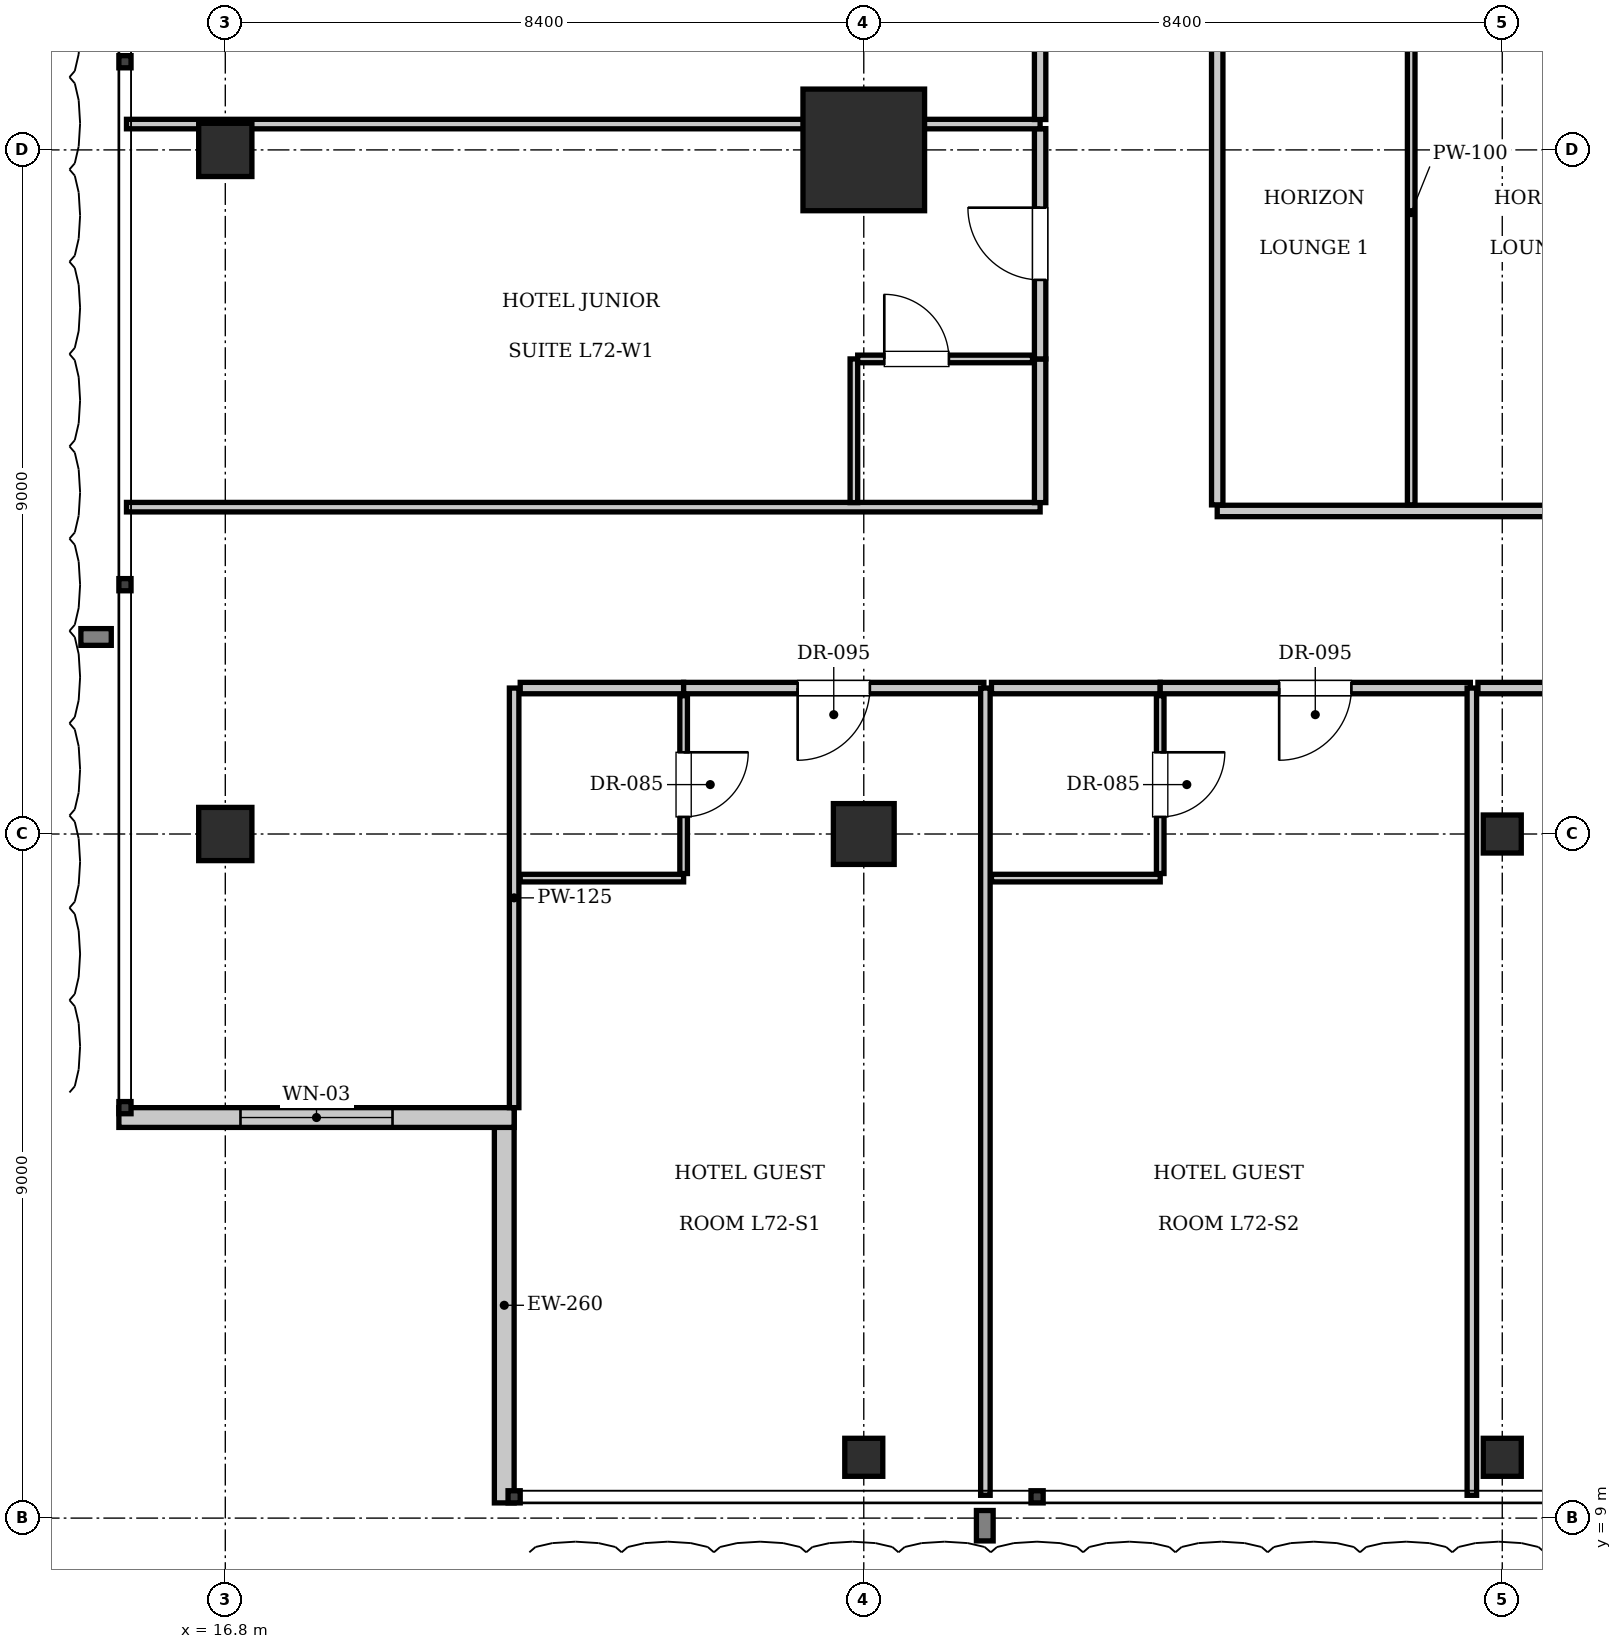
"""IFC4 building model, lengths in metres.
Left out: names, types, materials, properties, quantities, classifications, styles, units other than length and angle.
Written with IfcOpenShell. Run it as: python <this file> out.ifc"""

import sys

from ifc_helpers import new_model, si_unit, direction, frame, frame_2d, origin, origin_2d, place, context, subcontext, project, spatial, rectangle, i_section, extrude, element, fill, save


model = new_model("IFC4")
c1 = context("Model", 3, precision=1e-05, world=origin(), true_north=direction((0.0, 1.0)))
c2 = subcontext(c1, "Body", "Model", "MODEL_VIEW")
j1 = project(units=[si_unit("LENGTHUNIT", "METRE"), si_unit("PLANEANGLEUNIT", "RADIAN")], contexts=[c1])
p1 = place(None, origin())
s1 = spatial("IfcSite", under=j1, at=p1, CompositionType="ELEMENT")
p2 = place(p1, origin())
s2 = spatial("IfcBuilding", under=s1, at=p2, CompositionType="ELEMENT")
p3 = place(p2, frame((0.0, 0.0, 293.3)))
s3 = spatial("IfcBuildingStorey", under=s2, at=p3, CompositionType="ELEMENT", Elevation=293.3)
p4 = place(p3, frame((25.2, 27.0, 0.0), z_axis=(0.0, 0.0, 1.0), x_axis=(1.0, 0.0, 0.0)))
e1 = element("IfcColumn", 1, at=p4, inside=s3, PredefinedType="COLUMN", context=c2, shape_type="SweptSolid", body=[
    extrude(rectangle(XDim=1.6, YDim=1.6, at=origin_2d()), origin(), (0.0, 0.0, 1.0), 3.85),
])
p5 = place(p3, frame((25.2, 18.0, 0.0), z_axis=(0.0, 0.0, 1.0), x_axis=(1.0, 0.0, 0.0)))
e2 = element("IfcColumn", 2, at=p5, inside=s3, PredefinedType="COLUMN", context=c2, shape_type="SweptSolid", body=[
    extrude(rectangle(XDim=0.8, YDim=0.8, at=origin_2d()), origin(), (0.0, 0.0, 1.0), 3.85),
])
p6 = place(p3, frame((33.6, 18.0, 0.0), z_axis=(0.0, 0.0, 1.0), x_axis=(1.0, 0.0, 0.0)))
e3 = element("IfcColumn", 3, at=p6, inside=s3, PredefinedType="COLUMN", context=c2, shape_type="SweptSolid", body=[
    extrude(i_section(OverallWidth=0.5, OverallDepth=0.5, WebThickness=0.022, FlangeThickness=0.032, at=origin_2d()), origin(), (0.0, 0.0, 1.0), 3.85),
])
for number, where, z_axis, x_axis in (
    (4, (16.8, 18.0, 0.0), (0.0, 0.0, 1.0), (1.0, 0.0, 0.0)),
    (5, (16.8, 27.0, 0.0), (0.0, 0.0, 1.0), (1.0, 0.0, 0.0)),
):
    element("IfcColumn", number, at=place(p3, frame(where, z_axis=z_axis, x_axis=x_axis)), inside=s3, PredefinedType="COLUMN", context=c2, shape_type="SweptSolid", body=[
        extrude(rectangle(XDim=0.7, YDim=0.7, at=origin_2d()), origin(), (0.0, 0.0, 1.0), 3.85),
    ])
for number, where, z_axis, x_axis in (
    (6, (25.2, 9.8, 0.0), (0.0, 0.0, 1.0), (1.0, 0.0, 0.0)),
    (7, (33.6, 9.8, 0.0), (0.0, 0.0, 1.0), (1.0, 0.0, 0.0)),
):
    element("IfcColumn", number, at=place(p3, frame(where, z_axis=z_axis, x_axis=x_axis)), inside=s3, PredefinedType="COLUMN", context=c2, shape_type="SweptSolid", body=[
        extrude(i_section(OverallWidth=0.5, OverallDepth=0.5, WebThickness=0.022, FlangeThickness=0.032, at=origin_2d()), origin(), (0.0, 0.0, 1.0), 3.85),
    ])
p7 = place(p3, frame((20.47, 9.2, 0.0), z_axis=(0.0, 0.0, 1.0), x_axis=(0.0, 1.0, 0.0)))
e8 = element("IfcWall", 8, at=p7, inside=s3, PredefinedType="SOLIDWALL", context=c2, shape_type="SweptSolid", body=[
    extrude(rectangle(XDim=5.2, YDim=0.26, at=frame_2d((2.6, 0.0))), origin(), (0.0, 0.0, 1.0), 3.61),
])
p8 = place(p3, frame((20.6, 14.27, 0.0), z_axis=(0.0, 0.0, 1.0), x_axis=(-1.0, 0.0, 0.0)))
e9 = element("IfcWall", 9, at=p8, inside=s3, PredefinedType="SOLIDWALL", context=c2, shape_type="SweptSolid", body=[
    extrude(rectangle(XDim=5.2, YDim=0.26, at=frame_2d((2.6, 0.0))), origin(), (0.0, 0.0, 1.0), 3.61),
])
p9 = place(p8, frame((1.6, 0.0, 0.9)))
e10 = element("IfcOpeningElement", 10, at=p9, cuts=e9, PredefinedType="OPENING", context=c2, shape_type="SweptSolid", body=[
    extrude(rectangle(XDim=2.0, YDim=2.2, at=frame_2d((1.0, 1.1))), frame((0.0, 0.14, 0.0), z_axis=(0.0, -1.0, 0.0), x_axis=(1.0, 0.0, 0.0)), (0.0, 0.0, 1.0), 0.28),
])
p10 = place(p3, frame((29.85, 22.25, 0.0), z_axis=(0.0, 0.0, 1.0), x_axis=(1.0, 0.0, 0.0)))
e11 = element("IfcWall", 11, at=p10, inside=s3, PredefinedType="PARTITIONING", context=c2, shape_type="SweptSolid", body=[
    extrude(rectangle(XDim=15.95, YDim=0.15, at=frame_2d((7.975, 0.0))), origin(), (0.0, 0.0, 1.0), 3.61),
])
p11 = place(p3, frame((29.85, 22.33, 0.0), z_axis=(0.0, 0.0, 1.0), x_axis=(0.0, 1.0, 0.0)))
e12 = element("IfcWall", 12, at=p11, inside=s3, PredefinedType="PARTITIONING", context=c2, shape_type="SweptSolid", body=[
    extrude(rectangle(XDim=7.69, YDim=0.15, at=frame_2d((3.845, 0.0))), origin(), (0.0, 0.0, 1.0), 3.61),
])
p12 = place(p3, frame((32.402, 22.33, 0.0), z_axis=(0.0, 0.0, 1.0), x_axis=(0.0, 1.0, 0.0)))
e13 = element("IfcWall", 13, at=p12, inside=s3, PredefinedType="PARTITIONING", context=c2, shape_type="SweptSolid", body=[
    extrude(rectangle(XDim=7.69, YDim=0.1, at=frame_2d((3.845, 0.0))), origin(), (0.0, 0.0, 1.0), 3.61),
])
p13 = place(p3, frame((20.6, 14.4, 0.0), z_axis=(0.0, 0.0, 1.0), x_axis=(0.0, 1.0, 0.0)))
e14 = element("IfcWall", 14, at=p13, inside=s3, PredefinedType="PARTITIONING", context=c2, shape_type="SweptSolid", body=[
    extrude(rectangle(XDim=5.52, YDim=0.125, at=frame_2d((2.76, 0.0))), origin(), (0.0, 0.0, 1.0), 3.61),
])
p14 = place(p3, frame((20.68, 19.92, 0.0), z_axis=(0.0, 0.0, 1.0), x_axis=(1.0, 0.0, 0.0)))
e15 = element("IfcWall", 15, at=p14, inside=s3, PredefinedType="PARTITIONING", context=c2, shape_type="SweptSolid", body=[
    extrude(rectangle(XDim=2.15, YDim=0.15, at=frame_2d((1.075, 0.0))), origin(), (0.0, 0.0, 1.0), 3.61),
])
p15 = place(p3, frame((20.68, 17.42, 0.0), z_axis=(0.0, 0.0, 1.0), x_axis=(1.0, 0.0, 0.0)))
e16 = element("IfcWall", 16, at=p15, inside=s3, PredefinedType="PARTITIONING", context=c2, shape_type="SweptSolid", body=[
    extrude(rectangle(XDim=2.15, YDim=0.1, at=frame_2d((1.075, 0.0))), origin(), (0.0, 0.0, 1.0), 3.61),
])
p16 = place(p3, frame((22.83, 17.48, 0.0), z_axis=(0.0, 0.0, 1.0), x_axis=(0.0, 1.0, 0.0)))
e17 = element("IfcWall", 17, at=p16, inside=s3, PredefinedType="PARTITIONING", context=c2, shape_type="SweptSolid", body=[
    extrude(rectangle(XDim=2.34, YDim=0.1, at=frame_2d((1.17, 0.0))), origin(), (0.0, 0.0, 1.0), 3.61),
])
p17 = place(p16, frame((0.745, 0.0, 0.0)))
e18 = element("IfcOpeningElement", 18, at=p17, cuts=e17, PredefinedType="OPENING", context=c2, shape_type="SweptSolid", body=[
    extrude(rectangle(XDim=0.85, YDim=2.1, at=frame_2d((0.425, 1.05))), frame((0.0, 0.06, 0.0), z_axis=(0.0, -1.0, 0.0), x_axis=(1.0, 0.0, 0.0)), (0.0, 0.0, 1.0), 0.12),
])
p18 = place(p3, frame((22.83, 19.92, 0.0), z_axis=(0.0, 0.0, 1.0), x_axis=(1.0, 0.0, 0.0)))
e19 = element("IfcWall", 19, at=p18, inside=s3, PredefinedType="PARTITIONING", context=c2, shape_type="SweptSolid", body=[
    extrude(rectangle(XDim=3.95, YDim=0.15, at=frame_2d((1.975, 0.0))), origin(), (0.0, 0.0, 1.0), 3.61),
])
p19 = place(p18, frame((1.5, 0.0, 0.0)))
e20 = element("IfcOpeningElement", 20, at=p19, cuts=e19, PredefinedType="OPENING", context=c2, shape_type="SweptSolid", body=[
    extrude(rectangle(XDim=0.95, YDim=2.15, at=frame_2d((0.475, 1.075))), frame((0.0, 0.085, 0.0), z_axis=(0.0, -1.0, 0.0), x_axis=(1.0, 0.0, 0.0)), (0.0, 0.0, 1.0), 0.17),
])
p20 = place(p3, frame((26.8, 9.3, 0.0), z_axis=(0.0, 0.0, 1.0), x_axis=(0.0, 1.0, 0.0)))
e21 = element("IfcWall", 21, at=p20, inside=s3, PredefinedType="PARTITIONING", context=c2, shape_type="SweptSolid", body=[
    extrude(rectangle(XDim=10.62, YDim=0.125, at=frame_2d((5.31, 0.0))), origin(), (0.0, 0.0, 1.0), 3.61),
])
p21 = place(p3, frame((26.88, 19.92, 0.0), z_axis=(0.0, 0.0, 1.0), x_axis=(1.0, 0.0, 0.0)))
e22 = element("IfcWall", 22, at=p21, inside=s3, PredefinedType="PARTITIONING", context=c2, shape_type="SweptSolid", body=[
    extrude(rectangle(XDim=2.22, YDim=0.15, at=frame_2d((1.11, 0.0))), origin(), (0.0, 0.0, 1.0), 3.61),
])
p22 = place(p3, frame((26.88, 17.42, 0.0), z_axis=(0.0, 0.0, 1.0), x_axis=(1.0, 0.0, 0.0)))
e23 = element("IfcWall", 23, at=p22, inside=s3, PredefinedType="PARTITIONING", context=c2, shape_type="SweptSolid", body=[
    extrude(rectangle(XDim=2.22, YDim=0.1, at=frame_2d((1.11, 0.0))), origin(), (0.0, 0.0, 1.0), 3.61),
])
p23 = place(p3, frame((29.1, 17.48, 0.0), z_axis=(0.0, 0.0, 1.0), x_axis=(0.0, 1.0, 0.0)))
e24 = element("IfcWall", 24, at=p23, inside=s3, PredefinedType="PARTITIONING", context=c2, shape_type="SweptSolid", body=[
    extrude(rectangle(XDim=2.34, YDim=0.1, at=frame_2d((1.17, 0.0))), origin(), (0.0, 0.0, 1.0), 3.61),
])
p24 = place(p23, frame((0.745, 0.0, 0.0)))
e25 = element("IfcOpeningElement", 25, at=p24, cuts=e24, PredefinedType="OPENING", context=c2, shape_type="SweptSolid", body=[
    extrude(rectangle(XDim=0.85, YDim=2.1, at=frame_2d((0.425, 1.05))), frame((0.0, 0.06, 0.0), z_axis=(0.0, -1.0, 0.0), x_axis=(1.0, 0.0, 0.0)), (0.0, 0.0, 1.0), 0.12),
])
p25 = place(p3, frame((29.1, 19.92, 0.0), z_axis=(0.0, 0.0, 1.0), x_axis=(1.0, 0.0, 0.0)))
e26 = element("IfcWall", 26, at=p25, inside=s3, PredefinedType="PARTITIONING", context=c2, shape_type="SweptSolid", body=[
    extrude(rectangle(XDim=4.08, YDim=0.15, at=frame_2d((2.04, 0.0))), origin(), (0.0, 0.0, 1.0), 3.61),
])
p26 = place(p25, frame((1.565, 0.0, 0.0)))
e27 = element("IfcOpeningElement", 27, at=p26, cuts=e26, PredefinedType="OPENING", context=c2, shape_type="SweptSolid", body=[
    extrude(rectangle(XDim=0.95, YDim=2.15, at=frame_2d((0.475, 1.075))), frame((0.0, 0.085, 0.0), z_axis=(0.0, -1.0, 0.0), x_axis=(1.0, 0.0, 0.0)), (0.0, 0.0, 1.0), 0.17),
])
p27 = place(p3, frame((33.2, 9.3, 0.0), z_axis=(0.0, 0.0, 1.0), x_axis=(0.0, 1.0, 0.0)))
e28 = element("IfcWall", 28, at=p27, inside=s3, PredefinedType="PARTITIONING", context=c2, shape_type="SweptSolid", body=[
    extrude(rectangle(XDim=10.62, YDim=0.125, at=frame_2d((5.31, 0.0))), origin(), (0.0, 0.0, 1.0), 3.61),
])
p28 = place(p3, frame((33.28, 19.92, 0.0), z_axis=(0.0, 0.0, 1.0), x_axis=(1.0, 0.0, 0.0)))
e29 = element("IfcWall", 29, at=p28, inside=s3, PredefinedType="PARTITIONING", context=c2, shape_type="SweptSolid", body=[
    extrude(rectangle(XDim=4.17, YDim=0.15, at=frame_2d((2.085, 0.0))), origin(), (0.0, 0.0, 1.0), 3.61),
])
p29 = place(p28, frame((1.61, 0.0, 0.0)))
e30 = element("IfcOpeningElement", 30, at=p29, cuts=e29, PredefinedType="OPENING", context=c2, shape_type="SweptSolid", body=[
    extrude(rectangle(XDim=0.95, YDim=2.15, at=frame_2d((0.475, 1.075))), frame((0.0, 0.085, 0.0), z_axis=(0.0, -1.0, 0.0), x_axis=(1.0, 0.0, 0.0)), (0.0, 0.0, 1.0), 0.17),
])
p30 = place(p3, frame((15.5, 22.3, 0.0), z_axis=(0.0, 0.0, 1.0), x_axis=(1.0, 0.0, 0.0)))
e31 = element("IfcWall", 31, at=p30, inside=s3, PredefinedType="PARTITIONING", context=c2, shape_type="SweptSolid", body=[
    extrude(rectangle(XDim=12.02, YDim=0.125, at=frame_2d((6.01, 0.0))), origin(), (0.0, 0.0, 1.0), 3.61),
])
p31 = place(p3, frame((27.52, 22.36, 0.0), z_axis=(0.0, 0.0, 1.0), x_axis=(0.0, 1.0, 0.0)))
e32 = element("IfcWall", 32, at=p31, inside=s3, PredefinedType="PARTITIONING", context=c2, shape_type="SweptSolid", body=[
    extrude(rectangle(XDim=1.89, YDim=0.15, at=frame_2d((0.945, 0.0))), origin(), (0.0, 0.0, 1.0), 3.61),
])
p32 = place(p3, frame((27.52, 24.25, 0.0), z_axis=(0.0, 0.0, 1.0), x_axis=(0.0, 1.0, 0.0)))
e33 = element("IfcWall", 33, at=p32, inside=s3, PredefinedType="PARTITIONING", context=c2, shape_type="SweptSolid", body=[
    extrude(rectangle(XDim=3.03, YDim=0.15, at=frame_2d((1.515, 0.0))), origin(), (0.0, 0.0, 1.0), 3.61),
])
p33 = place(p32, frame((1.04, 0.0, 0.0)))
e34 = element("IfcOpeningElement", 34, at=p33, cuts=e33, PredefinedType="OPENING", context=c2, shape_type="SweptSolid", body=[
    extrude(rectangle(XDim=0.95, YDim=2.15, at=frame_2d((0.475, 1.075))), frame((0.0, 0.085, 0.0), z_axis=(0.0, -1.0, 0.0), x_axis=(1.0, 0.0, 0.0)), (0.0, 0.0, 1.0), 0.17),
])
p34 = place(p3, frame((25.07, 22.36, 0.0), z_axis=(0.0, 0.0, 1.0), x_axis=(0.0, 1.0, 0.0)))
e35 = element("IfcWall", 35, at=p34, inside=s3, PredefinedType="PARTITIONING", context=c2, shape_type="SweptSolid", body=[
    extrude(rectangle(XDim=1.89, YDim=0.1, at=frame_2d((0.945, 0.0))), origin(), (0.0, 0.0, 1.0), 3.61),
])
p35 = place(p3, frame((25.12, 24.25, 0.0), z_axis=(0.0, 0.0, 1.0), x_axis=(1.0, 0.0, 0.0)))
e36 = element("IfcWall", 36, at=p35, inside=s3, PredefinedType="PARTITIONING", context=c2, shape_type="SweptSolid", body=[
    extrude(rectangle(XDim=2.3, YDim=0.1, at=frame_2d((1.15, 0.0))), origin(), (0.0, 0.0, 1.0), 3.61),
])
p36 = place(p35, frame((0.35, 0.0, 0.0)))
e37 = element("IfcOpeningElement", 37, at=p36, cuts=e36, PredefinedType="OPENING", context=c2, shape_type="SweptSolid", body=[
    extrude(rectangle(XDim=0.85, YDim=2.1, at=frame_2d((0.425, 1.05))), frame((0.0, 0.06, 0.0), z_axis=(0.0, -1.0, 0.0), x_axis=(1.0, 0.0, 0.0)), (0.0, 0.0, 1.0), 0.12),
])
p37 = place(p3, frame((15.5, 27.34, 0.0), z_axis=(0.0, 0.0, 1.0), x_axis=(1.0, 0.0, 0.0)))
e38 = element("IfcWall", 38, at=p37, inside=s3, PredefinedType="PARTITIONING", context=c2, shape_type="SweptSolid", body=[
    extrude(rectangle(XDim=12.02, YDim=0.125, at=frame_2d((6.01, 0.0))), origin(), (0.0, 0.0, 1.0), 3.61),
])
p38 = place(p3, frame((27.52, 27.4, 0.0), z_axis=(0.0, 0.0, 1.0), x_axis=(0.0, 1.0, 0.0)))
e39 = element("IfcWall", 39, at=p38, inside=s3, PredefinedType="PARTITIONING", context=c2, shape_type="SweptSolid", body=[
    extrude(rectangle(XDim=3.03, YDim=0.15, at=frame_2d((1.515, 0.0))), origin(), (0.0, 0.0, 1.0), 3.61),
])
p39 = place(p38, frame((1.04, 0.0, 0.0)))
e40 = element("IfcOpeningElement", 40, at=p39, cuts=e39, PredefinedType="OPENING", context=c2, shape_type="SweptSolid", body=[
    extrude(rectangle(XDim=0.95, YDim=2.15, at=frame_2d((0.475, 1.075))), frame((0.0, 0.085, 0.0), z_axis=(0.0, -1.0, 0.0), x_axis=(1.0, 0.0, 0.0)), (0.0, 0.0, 1.0), 0.17),
])
p40 = place(p9, origin())
e41 = element("IfcWindow", 41, at=p40, inside=s3, PartitioningType="SINGLE_PANEL", PredefinedType="WINDOW", context=c2, shape_type="SweptSolid", body=[
    extrude(rectangle(XDim=2.0, YDim=2.2, at=frame_2d((1.0, 1.1))), frame((0.0, 0.03, 0.0), z_axis=(0.0, -1.0, 0.0), x_axis=(1.0, 0.0, 0.0)), (0.0, 0.0, 1.0), 0.06),
])
fill(e10, e41)
p41 = place(p17, frame((0.85, 0.0, 0.0), z_axis=(0.0, 0.0, 1.0), x_axis=(-1.0, 0.0, 0.0)))
e42 = element("IfcDoor", 42, at=p41, inside=s3, OperationType="SINGLE_SWING_LEFT", PredefinedType="DOOR", context=c2, shape_type="SweptSolid", body=[
    extrude(rectangle(XDim=0.85, YDim=2.1, at=frame_2d((0.425, 1.05))), frame((0.0, 0.025, 0.0), z_axis=(0.0, -1.0, 0.0), x_axis=(1.0, 0.0, 0.0)), (0.0, 0.0, 1.0), 0.05),
])
fill(e18, e42)
p42 = place(p19, frame((0.95, 0.0, 0.0), z_axis=(0.0, 0.0, 1.0), x_axis=(-1.0, 0.0, 0.0)))
e43 = element("IfcDoor", 43, at=p42, inside=s3, OperationType="SINGLE_SWING_RIGHT", PredefinedType="DOOR", context=c2, shape_type="SweptSolid", body=[
    extrude(rectangle(XDim=0.95, YDim=2.15, at=frame_2d((0.475, 1.075))), frame((0.0, 0.025, 0.0), z_axis=(0.0, -1.0, 0.0), x_axis=(1.0, 0.0, 0.0)), (0.0, 0.0, 1.0), 0.05),
])
fill(e20, e43)
p43 = place(p24, frame((0.85, 0.0, 0.0), z_axis=(0.0, 0.0, 1.0), x_axis=(-1.0, 0.0, 0.0)))
e44 = element("IfcDoor", 44, at=p43, inside=s3, OperationType="SINGLE_SWING_LEFT", PredefinedType="DOOR", context=c2, shape_type="SweptSolid", body=[
    extrude(rectangle(XDim=0.85, YDim=2.1, at=frame_2d((0.425, 1.05))), frame((0.0, 0.025, 0.0), z_axis=(0.0, -1.0, 0.0), x_axis=(1.0, 0.0, 0.0)), (0.0, 0.0, 1.0), 0.05),
])
fill(e25, e44)
p44 = place(p26, frame((0.95, 0.0, 0.0), z_axis=(0.0, 0.0, 1.0), x_axis=(-1.0, 0.0, 0.0)))
e45 = element("IfcDoor", 45, at=p44, inside=s3, OperationType="SINGLE_SWING_RIGHT", PredefinedType="DOOR", context=c2, shape_type="SweptSolid", body=[
    extrude(rectangle(XDim=0.95, YDim=2.15, at=frame_2d((0.475, 1.075))), frame((0.0, 0.025, 0.0), z_axis=(0.0, -1.0, 0.0), x_axis=(1.0, 0.0, 0.0)), (0.0, 0.0, 1.0), 0.05),
])
fill(e27, e45)
p45 = place(p36, origin())
e46 = element("IfcDoor", 46, at=p45, inside=s3, OperationType="SINGLE_SWING_LEFT", PredefinedType="DOOR", context=c2, shape_type="SweptSolid", body=[
    extrude(rectangle(XDim=0.85, YDim=2.1, at=frame_2d((0.425, 1.05))), frame((0.0, 0.025, 0.0), z_axis=(0.0, -1.0, 0.0), x_axis=(1.0, 0.0, 0.0)), (0.0, 0.0, 1.0), 0.05),
])
fill(e37, e46)
p46 = place(p33, origin())
e47 = element("IfcDoor", 47, at=p46, inside=s3, OperationType="SINGLE_SWING_RIGHT", PredefinedType="DOOR", context=c2, shape_type="SweptSolid", body=[
    extrude(rectangle(XDim=0.95, YDim=2.15, at=frame_2d((0.475, 1.075))), frame((0.0, 0.025, 0.0), z_axis=(0.0, -1.0, 0.0), x_axis=(1.0, 0.0, 0.0)), (0.0, 0.0, 1.0), 0.05),
])
fill(e34, e47)
save(model, sys.argv[1])
